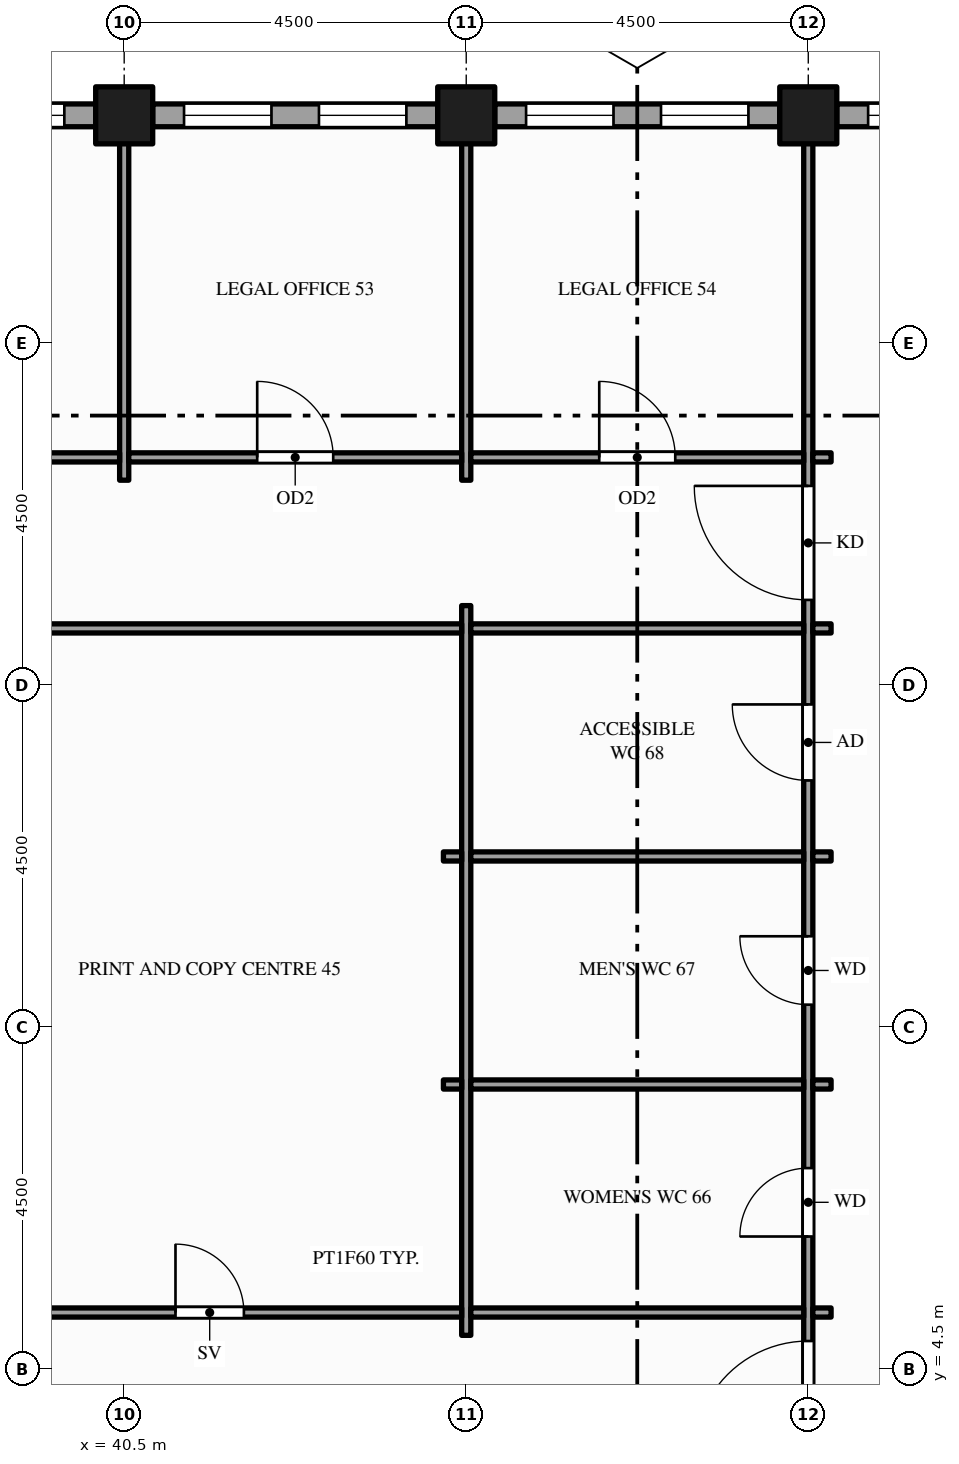
"""IFC4 building model, lengths in metres.
Left out: names, types, materials, properties, quantities, classifications, styles, units other than length and angle.
Written with IfcOpenShell. Run it as: python <this file> out.ifc"""

import sys

from ifc_helpers import new_model, si_unit, direction, frame, frame_2d, origin, origin_2d, place, context, subcontext, project, spatial, rectangle, hollow_rectangle, extrude, element, fill, save


model = new_model("IFC4")
c1 = context("Model", 3, precision=1e-05, world=origin(), true_north=direction((0.0, 1.0)))
c2 = subcontext(c1, "Body", "Model", "MODEL_VIEW")
j1 = project(units=[si_unit("LENGTHUNIT", "METRE"), si_unit("PLANEANGLEUNIT", "RADIAN")], contexts=[c1])
p1 = place(None, origin())
s1 = spatial("IfcSite", under=j1, at=p1, CompositionType="ELEMENT")
p2 = place(p1, origin())
s2 = spatial("IfcBuilding", under=s1, at=p2, CompositionType="ELEMENT")
p3 = place(p2, frame((0.0, 0.0, 215.0)))
s3 = spatial("IfcBuildingStorey", under=s2, at=p3, CompositionType="ELEMENT", Elevation=215.0)
for number, where, z_axis, x_axis in (
    (1, (40.5, 21.0, -0.15), (0.0, 0.0, 1.0), (1.0, 0.0, 0.0)),
    (2, (45.0, 21.0, -0.15), (0.0, 0.0, 1.0), (1.0, 0.0, 0.0)),
    (3, (49.5, 21.0, -0.15), (0.0, 0.0, 1.0), (1.0, 0.0, 0.0)),
):
    element("IfcColumn", number, at=place(p3, frame(where, z_axis=z_axis, x_axis=x_axis)), inside=s3, PredefinedType="COLUMN", context=c2, shape_type="SweptSolid", body=[
        extrude(hollow_rectangle(XDim=0.75, YDim=0.75, WallThickness=0.036, at=origin_2d()), origin(), (0.0, 0.0, 1.0), 4.0),
    ])
p4 = place(p3, frame((54.0, 21.0, 0.0), z_axis=(0.0, 0.0, 1.0), x_axis=(-1.0, 0.0, 0.0)))
e4 = element("IfcWall", 4, at=p4, inside=s3, PredefinedType="STANDARD", context=c2, shape_type="SweptSolid", body=[
    extrude(rectangle(XDim=4.125, YDim=0.3, at=frame_2d((2.062, 0.0))), origin(), (0.0, 0.0, 1.0), 2.87),
])
p5 = place(p4, frame((0.4, 0.0, 0.9)))
e5 = element("IfcOpeningElement", 5, at=p5, cuts=e4, PredefinedType="OPENING", context=c2, shape_type="SweptSolid", body=[
    extrude(rectangle(XDim=1.55, YDim=1.75, at=frame_2d((0.775, 0.875))), frame((0.0, 0.16, 0.0), z_axis=(0.0, -1.0, 0.0), x_axis=(1.0, 0.0, 0.0)), (0.0, 0.0, 1.0), 0.32),
])
p6 = place(p4, frame((2.562, 0.0, 0.9)))
e6 = element("IfcOpeningElement", 6, at=p6, cuts=e4, PredefinedType="OPENING", context=c2, shape_type="SweptSolid", body=[
    extrude(rectangle(XDim=1.15, YDim=1.75, at=frame_2d((0.575, 0.875))), frame((0.0, 0.16, 0.0), z_axis=(0.0, -1.0, 0.0), x_axis=(1.0, 0.0, 0.0)), (0.0, 0.0, 1.0), 0.32),
])
p7 = place(p3, frame((49.125, 21.0, 0.0), z_axis=(0.0, 0.0, 1.0), x_axis=(-1.0, 0.0, 0.0)))
e7 = element("IfcWall", 7, at=p7, inside=s3, PredefinedType="STANDARD", context=c2, shape_type="SweptSolid", body=[
    extrude(rectangle(XDim=3.75, YDim=0.3, at=frame_2d((1.875, 0.0))), origin(), (0.0, 0.0, 1.0), 2.87),
])
p8 = place(p7, frame((0.413, 0.0, 0.9)))
e8 = element("IfcOpeningElement", 8, at=p8, cuts=e7, PredefinedType="OPENING", context=c2, shape_type="SweptSolid", body=[
    extrude(rectangle(XDim=1.15, YDim=1.75, at=frame_2d((0.575, 0.875))), frame((0.0, 0.16, 0.0), z_axis=(0.0, -1.0, 0.0), x_axis=(1.0, 0.0, 0.0)), (0.0, 0.0, 1.0), 0.32),
])
p9 = place(p7, frame((2.188, 0.0, 0.9)))
e9 = element("IfcOpeningElement", 9, at=p9, cuts=e7, PredefinedType="OPENING", context=c2, shape_type="SweptSolid", body=[
    extrude(rectangle(XDim=1.15, YDim=1.75, at=frame_2d((0.575, 0.875))), frame((0.0, 0.16, 0.0), z_axis=(0.0, -1.0, 0.0), x_axis=(1.0, 0.0, 0.0)), (0.0, 0.0, 1.0), 0.32),
])
p10 = place(p3, frame((44.625, 21.0, 0.0), z_axis=(0.0, 0.0, 1.0), x_axis=(-1.0, 0.0, 0.0)))
e10 = element("IfcWall", 10, at=p10, inside=s3, PredefinedType="STANDARD", context=c2, shape_type="SweptSolid", body=[
    extrude(rectangle(XDim=3.75, YDim=0.3, at=frame_2d((1.875, 0.0))), origin(), (0.0, 0.0, 1.0), 2.87),
])
p11 = place(p10, frame((0.413, 0.0, 0.9)))
e11 = element("IfcOpeningElement", 11, at=p11, cuts=e10, PredefinedType="OPENING", context=c2, shape_type="SweptSolid", body=[
    extrude(rectangle(XDim=1.15, YDim=1.75, at=frame_2d((0.575, 0.875))), frame((0.0, 0.16, 0.0), z_axis=(0.0, -1.0, 0.0), x_axis=(1.0, 0.0, 0.0)), (0.0, 0.0, 1.0), 0.32),
])
p12 = place(p10, frame((2.188, 0.0, 0.9)))
e12 = element("IfcOpeningElement", 12, at=p12, cuts=e10, PredefinedType="OPENING", context=c2, shape_type="SweptSolid", body=[
    extrude(rectangle(XDim=1.15, YDim=1.75, at=frame_2d((0.575, 0.875))), frame((0.0, 0.16, 0.0), z_axis=(0.0, -1.0, 0.0), x_axis=(1.0, 0.0, 0.0)), (0.0, 0.0, 1.0), 0.32),
])
p13 = place(p3, frame((40.125, 21.0, 0.0), z_axis=(0.0, 0.0, 1.0), x_axis=(-1.0, 0.0, 0.0)))
e13 = element("IfcWall", 13, at=p13, inside=s3, PredefinedType="STANDARD", context=c2, shape_type="SweptSolid", body=[
    extrude(rectangle(XDim=3.75, YDim=0.3, at=frame_2d((1.875, 0.0))), origin(), (0.0, 0.0, 1.0), 2.87),
])
p14 = place(p13, frame((0.413, 0.0, 0.9)))
e14 = element("IfcOpeningElement", 14, at=p14, cuts=e13, PredefinedType="OPENING", context=c2, shape_type="SweptSolid", body=[
    extrude(rectangle(XDim=1.15, YDim=1.75, at=frame_2d((0.575, 0.875))), frame((0.0, 0.16, 0.0), z_axis=(0.0, -1.0, 0.0), x_axis=(1.0, 0.0, 0.0)), (0.0, 0.0, 1.0), 0.32),
])
p15 = place(p13, frame((2.188, 0.0, 0.9)))
e15 = element("IfcOpeningElement", 15, at=p15, cuts=e13, PredefinedType="OPENING", context=c2, shape_type="SweptSolid", body=[
    extrude(rectangle(XDim=1.15, YDim=1.75, at=frame_2d((0.575, 0.875))), frame((0.0, 0.16, 0.0), z_axis=(0.0, -1.0, 0.0), x_axis=(1.0, 0.0, 0.0)), (0.0, 0.0, 1.0), 0.32),
])
p16 = place(p3, frame((40.5, 16.2, 0.0), z_axis=(0.0, 0.0, 1.0), x_axis=(0.0, 1.0, 0.0)))
e16 = element("IfcWall", 16, at=p16, inside=s3, PredefinedType="PARTITIONING", context=c2, shape_type="SweptSolid", body=[
    extrude(rectangle(XDim=4.65, YDim=0.12, at=frame_2d((2.325, 0.0))), origin(), (0.0, 0.0, 1.0), 2.87),
])
p17 = place(p3, frame((45.0, 4.95, 0.0), z_axis=(0.0, 0.0, 1.0), x_axis=(0.0, 1.0, 0.0)))
e17 = element("IfcWall", 17, at=p17, inside=s3, PredefinedType="PARTITIONING", context=c2, shape_type="SweptSolid", body=[
    extrude(rectangle(XDim=9.6, YDim=0.12, at=frame_2d((4.8, 0.0))), origin(), (0.0, 0.0, 1.0), 2.87),
])
p18 = place(p3, frame((45.0, 16.2, 0.0), z_axis=(0.0, 0.0, 1.0), x_axis=(0.0, 1.0, 0.0)))
e18 = element("IfcWall", 18, at=p18, inside=s3, PredefinedType="PARTITIONING", context=c2, shape_type="SweptSolid", body=[
    extrude(rectangle(XDim=4.65, YDim=0.12, at=frame_2d((2.325, 0.0))), origin(), (0.0, 0.0, 1.0), 2.87),
])
p19 = place(p3, frame((49.5, -1.35, 0.0), z_axis=(0.0, 0.0, 1.0), x_axis=(0.0, 1.0, 0.0)))
e19 = element("IfcWall", 19, at=p19, inside=s3, PredefinedType="PARTITIONING", context=c2, shape_type="SweptSolid", body=[
    extrude(rectangle(XDim=22.2, YDim=0.12, at=frame_2d((11.1, 0.0))), origin(), (0.0, 0.0, 1.0), 2.87),
])
p20 = place(p19, frame((4.725, 0.0, 0.0)))
e20 = element("IfcOpeningElement", 20, at=p20, cuts=e19, PredefinedType="OPENING", context=c2, shape_type="SweptSolid", body=[
    extrude(rectangle(XDim=1.5, YDim=2.1, at=frame_2d((0.75, 1.05))), frame((0.0, 0.07, 0.0), z_axis=(0.0, -1.0, 0.0), x_axis=(1.0, 0.0, 0.0)), (0.0, 0.0, 1.0), 0.14),
])
p21 = place(p19, frame((15.975, 0.0, 0.0)))
e21 = element("IfcOpeningElement", 21, at=p21, cuts=e19, PredefinedType="OPENING", context=c2, shape_type="SweptSolid", body=[
    extrude(rectangle(XDim=1.5, YDim=2.1, at=frame_2d((0.75, 1.05))), frame((0.0, 0.07, 0.0), z_axis=(0.0, -1.0, 0.0), x_axis=(1.0, 0.0, 0.0)), (0.0, 0.0, 1.0), 0.14),
])
p22 = place(p19, frame((7.6, 0.0, 0.0)))
e22 = element("IfcOpeningElement", 22, at=p22, cuts=e19, PredefinedType="OPENING", context=c2, shape_type="SweptSolid", body=[
    extrude(rectangle(XDim=0.9, YDim=2.1, at=frame_2d((0.45, 1.05))), frame((0.0, 0.07, 0.0), z_axis=(0.0, -1.0, 0.0), x_axis=(1.0, 0.0, 0.0)), (0.0, 0.0, 1.0), 0.14),
])
p23 = place(p19, frame((10.65, 0.0, 0.0)))
e23 = element("IfcOpeningElement", 23, at=p23, cuts=e19, PredefinedType="OPENING", context=c2, shape_type="SweptSolid", body=[
    extrude(rectangle(XDim=0.9, YDim=2.1, at=frame_2d((0.45, 1.05))), frame((0.0, 0.07, 0.0), z_axis=(0.0, -1.0, 0.0), x_axis=(1.0, 0.0, 0.0)), (0.0, 0.0, 1.0), 0.14),
])
p24 = place(p19, frame((13.6, 0.0, 0.0)))
e24 = element("IfcOpeningElement", 24, at=p24, cuts=e19, PredefinedType="OPENING", context=c2, shape_type="SweptSolid", body=[
    extrude(rectangle(XDim=1.0, YDim=2.1, at=frame_2d((0.5, 1.05))), frame((0.0, 0.07, 0.0), z_axis=(0.0, -1.0, 0.0), x_axis=(1.0, 0.0, 0.0)), (0.0, 0.0, 1.0), 0.14),
])
p25 = place(p3, frame((38.31, 5.25, 0.0), z_axis=(0.0, 0.0, 1.0), x_axis=(1.0, 0.0, 0.0)))
e25 = element("IfcWall", 25, at=p25, inside=s3, PredefinedType="PARTITIONING", context=c2, shape_type="SweptSolid", body=[
    extrude(rectangle(XDim=6.63, YDim=0.12, at=frame_2d((3.315, 0.0))), origin(), (0.0, 0.0, 1.0), 2.87),
])
p26 = place(p25, frame((2.865, 0.0, 0.0)))
e26 = element("IfcOpeningElement", 26, at=p26, cuts=e25, PredefinedType="OPENING", context=c2, shape_type="SweptSolid", body=[
    extrude(rectangle(XDim=0.9, YDim=2.1, at=frame_2d((0.45, 1.05))), frame((0.0, 0.07, 0.0), z_axis=(0.0, -1.0, 0.0), x_axis=(1.0, 0.0, 0.0)), (0.0, 0.0, 1.0), 0.14),
])
p27 = place(p3, frame((45.06, 5.25, 0.0), z_axis=(0.0, 0.0, 1.0), x_axis=(1.0, 0.0, 0.0)))
e27 = element("IfcWall", 27, at=p27, inside=s3, PredefinedType="PARTITIONING", context=c2, shape_type="SweptSolid", body=[
    extrude(rectangle(XDim=4.38, YDim=0.12, at=frame_2d((2.19, 0.0))), origin(), (0.0, 0.0, 1.0), 2.87),
])
for number, where, z_axis, x_axis in (
    (28, (49.56, 5.25, 0.0), (0.0, 0.0, 1.0), (1.0, 0.0, 0.0)),
    (29, (44.7, 8.25, 0.0), (0.0, 0.0, 1.0), (1.0, 0.0, 0.0)),
):
    element("IfcWall", number, at=place(p3, frame(where, z_axis=z_axis, x_axis=x_axis)), inside=s3, PredefinedType="PARTITIONING", context=c2, shape_type="SweptSolid", body=[
        extrude(rectangle(XDim=0.24, YDim=0.12, at=frame_2d((0.12, 0.0))), origin(), (0.0, 0.0, 1.0), 2.87),
    ])
p28 = place(p3, frame((45.06, 8.25, 0.0), z_axis=(0.0, 0.0, 1.0), x_axis=(1.0, 0.0, 0.0)))
e30 = element("IfcWall", 30, at=p28, inside=s3, PredefinedType="PARTITIONING", context=c2, shape_type="SweptSolid", body=[
    extrude(rectangle(XDim=4.38, YDim=0.12, at=frame_2d((2.19, 0.0))), origin(), (0.0, 0.0, 1.0), 2.87),
])
for number, where, z_axis, x_axis in (
    (31, (49.56, 8.25, 0.0), (0.0, 0.0, 1.0), (1.0, 0.0, 0.0)),
    (32, (44.7, 11.25, 0.0), (0.0, 0.0, 1.0), (1.0, 0.0, 0.0)),
):
    element("IfcWall", number, at=place(p3, frame(where, z_axis=z_axis, x_axis=x_axis)), inside=s3, PredefinedType="PARTITIONING", context=c2, shape_type="SweptSolid", body=[
        extrude(rectangle(XDim=0.24, YDim=0.12, at=frame_2d((0.12, 0.0))), origin(), (0.0, 0.0, 1.0), 2.87),
    ])
p29 = place(p3, frame((45.06, 11.25, 0.0), z_axis=(0.0, 0.0, 1.0), x_axis=(1.0, 0.0, 0.0)))
e33 = element("IfcWall", 33, at=p29, inside=s3, PredefinedType="PARTITIONING", context=c2, shape_type="SweptSolid", body=[
    extrude(rectangle(XDim=4.38, YDim=0.12, at=frame_2d((2.19, 0.0))), origin(), (0.0, 0.0, 1.0), 2.87),
])
p30 = place(p3, frame((49.56, 11.25, 0.0), z_axis=(0.0, 0.0, 1.0), x_axis=(1.0, 0.0, 0.0)))
e34 = element("IfcWall", 34, at=p30, inside=s3, PredefinedType="PARTITIONING", context=c2, shape_type="SweptSolid", body=[
    extrude(rectangle(XDim=0.24, YDim=0.12, at=frame_2d((0.12, 0.0))), origin(), (0.0, 0.0, 1.0), 2.87),
])
p31 = place(p3, frame((38.31, 14.25, 0.0), z_axis=(0.0, 0.0, 1.0), x_axis=(1.0, 0.0, 0.0)))
e35 = element("IfcWall", 35, at=p31, inside=s3, PredefinedType="PARTITIONING", context=c2, shape_type="SweptSolid", body=[
    extrude(rectangle(XDim=6.63, YDim=0.12, at=frame_2d((3.315, 0.0))), origin(), (0.0, 0.0, 1.0), 2.87),
])
p32 = place(p3, frame((45.06, 14.25, 0.0), z_axis=(0.0, 0.0, 1.0), x_axis=(1.0, 0.0, 0.0)))
e36 = element("IfcWall", 36, at=p32, inside=s3, PredefinedType="PARTITIONING", context=c2, shape_type="SweptSolid", body=[
    extrude(rectangle(XDim=4.38, YDim=0.12, at=frame_2d((2.19, 0.0))), origin(), (0.0, 0.0, 1.0), 2.87),
])
p33 = place(p3, frame((49.56, 14.25, 0.0), z_axis=(0.0, 0.0, 1.0), x_axis=(1.0, 0.0, 0.0)))
e37 = element("IfcWall", 37, at=p33, inside=s3, PredefinedType="PARTITIONING", context=c2, shape_type="SweptSolid", body=[
    extrude(rectangle(XDim=0.24, YDim=0.12, at=frame_2d((0.12, 0.0))), origin(), (0.0, 0.0, 1.0), 2.87),
])
p34 = place(p3, frame((27.06, 16.5, 0.0), z_axis=(0.0, 0.0, 1.0), x_axis=(1.0, 0.0, 0.0)))
e38 = element("IfcWall", 38, at=p34, inside=s3, PredefinedType="PARTITIONING", context=c2, shape_type="SweptSolid", body=[
    extrude(rectangle(XDim=13.38, YDim=0.12, at=frame_2d((6.69, 0.0))), origin(), (0.0, 0.0, 1.0), 2.87),
])
p35 = place(p34, frame((5.79, 0.0, 0.0)))
e39 = element("IfcOpeningElement", 39, at=p35, cuts=e38, PredefinedType="OPENING", context=c2, shape_type="SweptSolid", body=[
    extrude(rectangle(XDim=1.8, YDim=2.1, at=frame_2d((0.9, 1.05))), frame((0.0, 0.07, 0.0), z_axis=(0.0, -1.0, 0.0), x_axis=(1.0, 0.0, 0.0)), (0.0, 0.0, 1.0), 0.14),
])
p36 = place(p3, frame((40.56, 16.5, 0.0), z_axis=(0.0, 0.0, 1.0), x_axis=(1.0, 0.0, 0.0)))
e40 = element("IfcWall", 40, at=p36, inside=s3, PredefinedType="PARTITIONING", context=c2, shape_type="SweptSolid", body=[
    extrude(rectangle(XDim=4.38, YDim=0.12, at=frame_2d((2.19, 0.0))), origin(), (0.0, 0.0, 1.0), 2.87),
])
p37 = place(p36, frame((1.69, 0.0, 0.0)))
e41 = element("IfcOpeningElement", 41, at=p37, cuts=e40, PredefinedType="OPENING", context=c2, shape_type="SweptSolid", body=[
    extrude(rectangle(XDim=1.0, YDim=2.1, at=frame_2d((0.5, 1.05))), frame((0.0, 0.07, 0.0), z_axis=(0.0, -1.0, 0.0), x_axis=(1.0, 0.0, 0.0)), (0.0, 0.0, 1.0), 0.14),
])
p38 = place(p3, frame((45.06, 16.5, 0.0), z_axis=(0.0, 0.0, 1.0), x_axis=(1.0, 0.0, 0.0)))
e42 = element("IfcWall", 42, at=p38, inside=s3, PredefinedType="PARTITIONING", context=c2, shape_type="SweptSolid", body=[
    extrude(rectangle(XDim=4.38, YDim=0.12, at=frame_2d((2.19, 0.0))), origin(), (0.0, 0.0, 1.0), 2.87),
])
p39 = place(p38, frame((1.69, 0.0, 0.0)))
e43 = element("IfcOpeningElement", 43, at=p39, cuts=e42, PredefinedType="OPENING", context=c2, shape_type="SweptSolid", body=[
    extrude(rectangle(XDim=1.0, YDim=2.1, at=frame_2d((0.5, 1.05))), frame((0.0, 0.07, 0.0), z_axis=(0.0, -1.0, 0.0), x_axis=(1.0, 0.0, 0.0)), (0.0, 0.0, 1.0), 0.14),
])
p40 = place(p3, frame((49.56, 16.5, 0.0), z_axis=(0.0, 0.0, 1.0), x_axis=(1.0, 0.0, 0.0)))
e44 = element("IfcWall", 44, at=p40, inside=s3, PredefinedType="PARTITIONING", context=c2, shape_type="SweptSolid", body=[
    extrude(rectangle(XDim=0.24, YDim=0.12, at=frame_2d((0.12, 0.0))), origin(), (0.0, 0.0, 1.0), 2.87),
])
p41 = place(p6, origin())
e45 = element("IfcWindow", 45, at=p41, inside=s3, PartitioningType="SINGLE_PANEL", PredefinedType="WINDOW", context=c2, shape_type="SweptSolid", body=[
    extrude(rectangle(XDim=1.15, YDim=1.75, at=frame_2d((0.575, 0.875))), frame((0.0, 0.03, 0.0), z_axis=(0.0, -1.0, 0.0), x_axis=(1.0, 0.0, 0.0)), (0.0, 0.0, 1.0), 0.06),
])
fill(e6, e45)
p42 = place(p8, origin())
e46 = element("IfcWindow", 46, at=p42, inside=s3, PartitioningType="SINGLE_PANEL", PredefinedType="WINDOW", context=c2, shape_type="SweptSolid", body=[
    extrude(rectangle(XDim=1.15, YDim=1.75, at=frame_2d((0.575, 0.875))), frame((0.0, 0.03, 0.0), z_axis=(0.0, -1.0, 0.0), x_axis=(1.0, 0.0, 0.0)), (0.0, 0.0, 1.0), 0.06),
])
fill(e8, e46)
p43 = place(p9, origin())
e47 = element("IfcWindow", 47, at=p43, inside=s3, PartitioningType="SINGLE_PANEL", PredefinedType="WINDOW", context=c2, shape_type="SweptSolid", body=[
    extrude(rectangle(XDim=1.15, YDim=1.75, at=frame_2d((0.575, 0.875))), frame((0.0, 0.03, 0.0), z_axis=(0.0, -1.0, 0.0), x_axis=(1.0, 0.0, 0.0)), (0.0, 0.0, 1.0), 0.06),
])
fill(e9, e47)
p44 = place(p11, origin())
e48 = element("IfcWindow", 48, at=p44, inside=s3, PartitioningType="SINGLE_PANEL", PredefinedType="WINDOW", context=c2, shape_type="SweptSolid", body=[
    extrude(rectangle(XDim=1.15, YDim=1.75, at=frame_2d((0.575, 0.875))), frame((0.0, 0.03, 0.0), z_axis=(0.0, -1.0, 0.0), x_axis=(1.0, 0.0, 0.0)), (0.0, 0.0, 1.0), 0.06),
])
fill(e11, e48)
p45 = place(p12, origin())
e49 = element("IfcWindow", 49, at=p45, inside=s3, PartitioningType="SINGLE_PANEL", PredefinedType="WINDOW", context=c2, shape_type="SweptSolid", body=[
    extrude(rectangle(XDim=1.15, YDim=1.75, at=frame_2d((0.575, 0.875))), frame((0.0, 0.03, 0.0), z_axis=(0.0, -1.0, 0.0), x_axis=(1.0, 0.0, 0.0)), (0.0, 0.0, 1.0), 0.06),
])
fill(e12, e49)
p46 = place(p14, origin())
e50 = element("IfcWindow", 50, at=p46, inside=s3, PartitioningType="SINGLE_PANEL", PredefinedType="WINDOW", context=c2, shape_type="SweptSolid", body=[
    extrude(rectangle(XDim=1.15, YDim=1.75, at=frame_2d((0.575, 0.875))), frame((0.0, 0.03, 0.0), z_axis=(0.0, -1.0, 0.0), x_axis=(1.0, 0.0, 0.0)), (0.0, 0.0, 1.0), 0.06),
])
fill(e14, e50)
p47 = place(p20, origin())
e51 = element("IfcDoor", 51, at=p47, inside=s3, OperationType="SINGLE_SWING_LEFT", PredefinedType="DOOR", context=c2, shape_type="SweptSolid", body=[
    extrude(rectangle(XDim=1.5, YDim=2.1, at=frame_2d((0.75, 1.05))), frame((0.0, 0.025, 0.0), z_axis=(0.0, -1.0, 0.0), x_axis=(1.0, 0.0, 0.0)), (0.0, 0.0, 1.0), 0.05),
])
fill(e20, e51)
p48 = place(p21, origin())
e52 = element("IfcDoor", 52, at=p48, inside=s3, OperationType="SINGLE_SWING_RIGHT", PredefinedType="DOOR", context=c2, shape_type="SweptSolid", body=[
    extrude(rectangle(XDim=1.5, YDim=2.1, at=frame_2d((0.75, 1.05))), frame((0.0, 0.025, 0.0), z_axis=(0.0, -1.0, 0.0), x_axis=(1.0, 0.0, 0.0)), (0.0, 0.0, 1.0), 0.05),
])
fill(e21, e52)
p49 = place(p26, origin())
e53 = element("IfcDoor", 53, at=p49, inside=s3, OperationType="SINGLE_SWING_LEFT", PredefinedType="DOOR", context=c2, shape_type="SweptSolid", body=[
    extrude(rectangle(XDim=0.9, YDim=2.1, at=frame_2d((0.45, 1.05))), frame((0.0, 0.025, 0.0), z_axis=(0.0, -1.0, 0.0), x_axis=(1.0, 0.0, 0.0)), (0.0, 0.0, 1.0), 0.05),
])
fill(e26, e53)
p50 = place(p22, origin())
e54 = element("IfcDoor", 54, at=p50, inside=s3, OperationType="SINGLE_SWING_LEFT", PredefinedType="DOOR", context=c2, shape_type="SweptSolid", body=[
    extrude(rectangle(XDim=0.9, YDim=2.1, at=frame_2d((0.45, 1.05))), frame((0.0, 0.025, 0.0), z_axis=(0.0, -1.0, 0.0), x_axis=(1.0, 0.0, 0.0)), (0.0, 0.0, 1.0), 0.05),
])
fill(e22, e54)
p51 = place(p23, origin())
e55 = element("IfcDoor", 55, at=p51, inside=s3, OperationType="SINGLE_SWING_RIGHT", PredefinedType="DOOR", context=c2, shape_type="SweptSolid", body=[
    extrude(rectangle(XDim=0.9, YDim=2.1, at=frame_2d((0.45, 1.05))), frame((0.0, 0.025, 0.0), z_axis=(0.0, -1.0, 0.0), x_axis=(1.0, 0.0, 0.0)), (0.0, 0.0, 1.0), 0.05),
])
fill(e23, e55)
p52 = place(p24, origin())
e56 = element("IfcDoor", 56, at=p52, inside=s3, OperationType="SINGLE_SWING_RIGHT", PredefinedType="DOOR", context=c2, shape_type="SweptSolid", body=[
    extrude(rectangle(XDim=1.0, YDim=2.1, at=frame_2d((0.5, 1.05))), frame((0.0, 0.025, 0.0), z_axis=(0.0, -1.0, 0.0), x_axis=(1.0, 0.0, 0.0)), (0.0, 0.0, 1.0), 0.05),
])
fill(e24, e56)
p53 = place(p37, origin())
e57 = element("IfcDoor", 57, at=p53, inside=s3, OperationType="SINGLE_SWING_LEFT", PredefinedType="DOOR", context=c2, shape_type="SweptSolid", body=[
    extrude(rectangle(XDim=1.0, YDim=2.1, at=frame_2d((0.5, 1.05))), frame((0.0, 0.025, 0.0), z_axis=(0.0, -1.0, 0.0), x_axis=(1.0, 0.0, 0.0)), (0.0, 0.0, 1.0), 0.05),
])
fill(e41, e57)
p54 = place(p39, origin())
e58 = element("IfcDoor", 58, at=p54, inside=s3, OperationType="SINGLE_SWING_LEFT", PredefinedType="DOOR", context=c2, shape_type="SweptSolid", body=[
    extrude(rectangle(XDim=1.0, YDim=2.1, at=frame_2d((0.5, 1.05))), frame((0.0, 0.025, 0.0), z_axis=(0.0, -1.0, 0.0), x_axis=(1.0, 0.0, 0.0)), (0.0, 0.0, 1.0), 0.05),
])
fill(e43, e58)
save(model, sys.argv[1])
